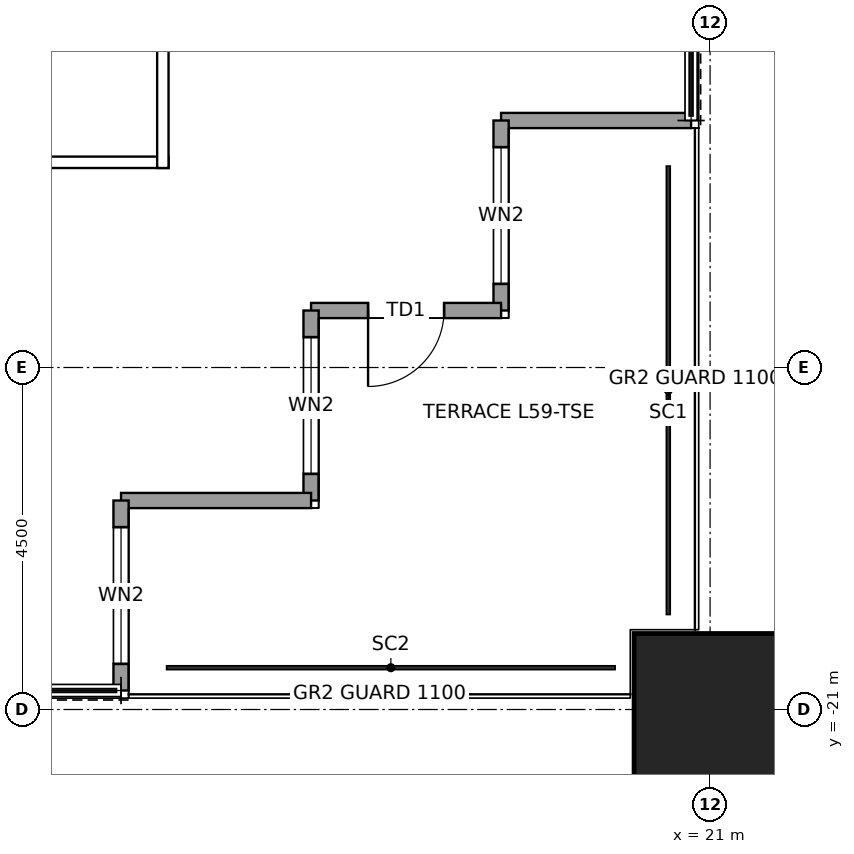
"""IFC4 building model, lengths in metres.
Left out: names, types, materials, properties, quantities, classifications, styles, units other than length and angle.
Written with IfcOpenShell. Run it as: python <this file> out.ifc"""

import sys

from ifc_helpers import new_model, si_unit, direction, frame, frame_2d, origin, origin_2d, place, context, subcontext, project, spatial, rectangle, hollow_rectangle, extrude, element, fill, save


model = new_model("IFC4")
c1 = context("Model", 3, precision=1e-05, world=origin(), true_north=direction((0.0, 1.0)))
c2 = subcontext(c1, "Body", "Model", "MODEL_VIEW")
j1 = project(units=[si_unit("LENGTHUNIT", "METRE"), si_unit("PLANEANGLEUNIT", "RADIAN")], contexts=[c1])
p1 = place(None, origin())
s1 = spatial("IfcSite", under=j1, at=p1, CompositionType="ELEMENT")
p2 = place(p1, origin())
s2 = spatial("IfcBuilding", under=s1, at=p2, CompositionType="ELEMENT")
p3 = place(p2, frame((0.0, 0.0, 271.9)))
s3 = spatial("IfcBuildingStorey", under=s2, at=p3, CompositionType="ELEMENT", Elevation=271.9)
p4 = place(p3, frame((21.0, -21.0, 0.0), z_axis=(0.0, 0.0, 1.0), x_axis=(1.0, 0.0, 0.0)))
e1 = element("IfcColumn", 1, at=p4, inside=s3, PredefinedType="COLUMN", context=c2, shape_type="SweptSolid", body=[
    extrude(hollow_rectangle(XDim=2.0, YDim=2.0, WallThickness=0.095, at=origin_2d()), origin(), (0.0, 0.0, 1.0), 4.0),
])
p5 = place(p3, frame((20.75, -13.25, 0.0), z_axis=(0.0, 0.0, 1.0), x_axis=(-1.0, 0.0, 0.0)))
e2 = element("IfcWall", 2, at=p5, inside=s3, PredefinedType="SOLIDWALL", context=c2, shape_type="SweptSolid", body=[
    extrude(rectangle(XDim=2.5, YDim=0.2, at=frame_2d((1.25, 0.0))), origin(), (0.0, 0.0, 1.0), 3.85),
])
p6 = place(p3, frame((18.25, -13.25, 0.0), z_axis=(0.0, 0.0, 1.0), x_axis=(0.0, -1.0, 0.0)))
e3 = element("IfcWall", 3, at=p6, inside=s3, PredefinedType="SOLIDWALL", context=c2, shape_type="SweptSolid", body=[
    extrude(rectangle(XDim=2.5, YDim=0.2, at=frame_2d((1.25, 0.0))), origin(), (0.0, 0.0, 1.0), 3.85),
])
p7 = place(p6, frame((0.35, 0.0, 0.3)))
e4 = element("IfcOpeningElement", 4, at=p7, cuts=e3, PredefinedType="OPENING", context=c2, shape_type="SweptSolid", body=[
    extrude(rectangle(XDim=1.8, YDim=2.4, at=frame_2d((0.9, 1.2))), frame((0.0, 0.11, 0.0), z_axis=(0.0, -1.0, 0.0), x_axis=(1.0, 0.0, 0.0)), (0.0, 0.0, 1.0), 0.22),
])
p8 = place(p3, frame((18.25, -15.75, 0.0), z_axis=(0.0, 0.0, 1.0), x_axis=(-1.0, 0.0, 0.0)))
e5 = element("IfcWall", 5, at=p8, inside=s3, PredefinedType="SOLIDWALL", context=c2, shape_type="SweptSolid", body=[
    extrude(rectangle(XDim=2.5, YDim=0.2, at=frame_2d((1.25, 0.0))), origin(), (0.0, 0.0, 1.0), 3.317),
])
p9 = place(p8, frame((0.75, 0.0, 0.0)))
e6 = element("IfcOpeningElement", 6, at=p9, cuts=e5, PredefinedType="OPENING", context=c2, shape_type="SweptSolid", body=[
    extrude(rectangle(XDim=1.0, YDim=2.4, at=frame_2d((0.5, 1.2))), frame((0.0, 0.11, 0.0), z_axis=(0.0, -1.0, 0.0), x_axis=(1.0, 0.0, 0.0)), (0.0, 0.0, 1.0), 0.22),
])
p10 = place(p3, frame((15.75, -15.75, 0.0), z_axis=(0.0, 0.0, 1.0), x_axis=(0.0, -1.0, 0.0)))
e7 = element("IfcWall", 7, at=p10, inside=s3, PredefinedType="SOLIDWALL", context=c2, shape_type="SweptSolid", body=[
    extrude(rectangle(XDim=2.5, YDim=0.2, at=frame_2d((1.25, 0.0))), origin(), (0.0, 0.0, 1.0), 3.85),
])
p11 = place(p10, frame((0.35, 0.0, 0.3)))
e8 = element("IfcOpeningElement", 8, at=p11, cuts=e7, PredefinedType="OPENING", context=c2, shape_type="SweptSolid", body=[
    extrude(rectangle(XDim=1.8, YDim=2.4, at=frame_2d((0.9, 1.2))), frame((0.0, 0.11, 0.0), z_axis=(0.0, -1.0, 0.0), x_axis=(1.0, 0.0, 0.0)), (0.0, 0.0, 1.0), 0.22),
])
p12 = place(p3, frame((15.75, -18.25, 0.0), z_axis=(0.0, 0.0, 1.0), x_axis=(-1.0, 0.0, 0.0)))
e9 = element("IfcWall", 9, at=p12, inside=s3, PredefinedType="SOLIDWALL", context=c2, shape_type="SweptSolid", body=[
    extrude(rectangle(XDim=2.5, YDim=0.2, at=frame_2d((1.25, 0.0))), origin(), (0.0, 0.0, 1.0), 3.85),
])
p13 = place(p3, frame((13.25, -18.25, 0.0), z_axis=(0.0, 0.0, 1.0), x_axis=(0.0, -1.0, 0.0)))
e10 = element("IfcWall", 10, at=p13, inside=s3, PredefinedType="SOLIDWALL", context=c2, shape_type="SweptSolid", body=[
    extrude(rectangle(XDim=2.5, YDim=0.2, at=frame_2d((1.25, 0.0))), origin(), (0.0, 0.0, 1.0), 3.85),
])
p14 = place(p13, frame((0.35, 0.0, 0.3)))
e11 = element("IfcOpeningElement", 11, at=p14, cuts=e10, PredefinedType="OPENING", context=c2, shape_type="SweptSolid", body=[
    extrude(rectangle(XDim=1.8, YDim=2.4, at=frame_2d((0.9, 1.2))), frame((0.0, 0.11, 0.0), z_axis=(0.0, -1.0, 0.0), x_axis=(1.0, 0.0, 0.0)), (0.0, 0.0, 1.0), 0.22),
])
p15 = place(p3, frame((-13.875, -13.8, 0.0), z_axis=(0.0, 0.0, 1.0), x_axis=(1.0, 0.0, 0.0)))
e12 = element("IfcWall", 12, at=p15, inside=s3, PredefinedType="PARTITIONING", context=c2, shape_type="SweptSolid", body=[
    extrude(rectangle(XDim=27.75, YDim=0.15, at=frame_2d((13.875, 0.0))), origin(), (0.0, 0.0, 1.0), 3.85),
])
p16 = place(p15, frame((3.975, 0.0, 0.0)))
e13 = element("IfcOpeningElement", 13, at=p16, cuts=e12, PredefinedType="OPENING", context=c2, shape_type="SweptSolid", body=[
    extrude(rectangle(XDim=1.0, YDim=2.4, at=frame_2d((0.5, 1.2))), frame((0.0, 0.085, 0.0), z_axis=(0.0, -1.0, 0.0), x_axis=(1.0, 0.0, 0.0)), (0.0, 0.0, 1.0), 0.17),
])
p17 = place(p3, frame((13.8, -13.875, 0.0), z_axis=(0.0, 0.0, 1.0), x_axis=(0.0, 1.0, 0.0)))
e14 = element("IfcWall", 14, at=p17, inside=s3, PredefinedType="PARTITIONING", context=c2, shape_type="SweptSolid", body=[
    extrude(rectangle(XDim=11.45, YDim=0.15, at=frame_2d((5.725, 0.0))), origin(), (0.0, 0.0, 1.0), 3.85),
])
p18 = place(p17, frame((5.225, 0.0, 0.0)))
e15 = element("IfcOpeningElement", 15, at=p18, cuts=e14, PredefinedType="OPENING", context=c2, shape_type="SweptSolid", body=[
    extrude(rectangle(XDim=1.0, YDim=2.4, at=frame_2d((0.5, 1.2))), frame((0.0, 0.085, 0.0), z_axis=(0.0, -1.0, 0.0), x_axis=(1.0, 0.0, 0.0)), (0.0, 0.0, 1.0), 0.17),
])
p19 = place(p7, origin())
e16 = element("IfcWindow", 16, at=p19, inside=s3, PartitioningType="SINGLE_PANEL", PredefinedType="WINDOW", context=c2, shape_type="SweptSolid", body=[
    extrude(rectangle(XDim=1.8, YDim=2.4, at=frame_2d((0.9, 1.2))), frame((0.0, 0.03, 0.0), z_axis=(0.0, -1.0, 0.0), x_axis=(1.0, 0.0, 0.0)), (0.0, 0.0, 1.0), 0.06),
])
fill(e4, e16)
p20 = place(p9, origin())
e17 = element("IfcDoor", 17, at=p20, inside=s3, OperationType="SINGLE_SWING_RIGHT", PredefinedType="DOOR", context=c2, shape_type="SweptSolid", body=[
    extrude(rectangle(XDim=1.0, YDim=2.4, at=frame_2d((0.5, 1.2))), frame((0.0, 0.025, 0.0), z_axis=(0.0, -1.0, 0.0), x_axis=(1.0, 0.0, 0.0)), (0.0, 0.0, 1.0), 0.05),
])
fill(e6, e17)
p21 = place(p11, origin())
e18 = element("IfcWindow", 18, at=p21, inside=s3, PartitioningType="SINGLE_PANEL", PredefinedType="WINDOW", context=c2, shape_type="SweptSolid", body=[
    extrude(rectangle(XDim=1.8, YDim=2.4, at=frame_2d((0.9, 1.2))), frame((0.0, 0.03, 0.0), z_axis=(0.0, -1.0, 0.0), x_axis=(1.0, 0.0, 0.0)), (0.0, 0.0, 1.0), 0.06),
])
fill(e8, e18)
p22 = place(p14, origin())
e19 = element("IfcWindow", 19, at=p22, inside=s3, PartitioningType="SINGLE_PANEL", PredefinedType="WINDOW", context=c2, shape_type="SweptSolid", body=[
    extrude(rectangle(XDim=1.8, YDim=2.4, at=frame_2d((0.9, 1.2))), frame((0.0, 0.03, 0.0), z_axis=(0.0, -1.0, 0.0), x_axis=(1.0, 0.0, 0.0)), (0.0, 0.0, 1.0), 0.06),
])
fill(e11, e19)
save(model, sys.argv[1])
